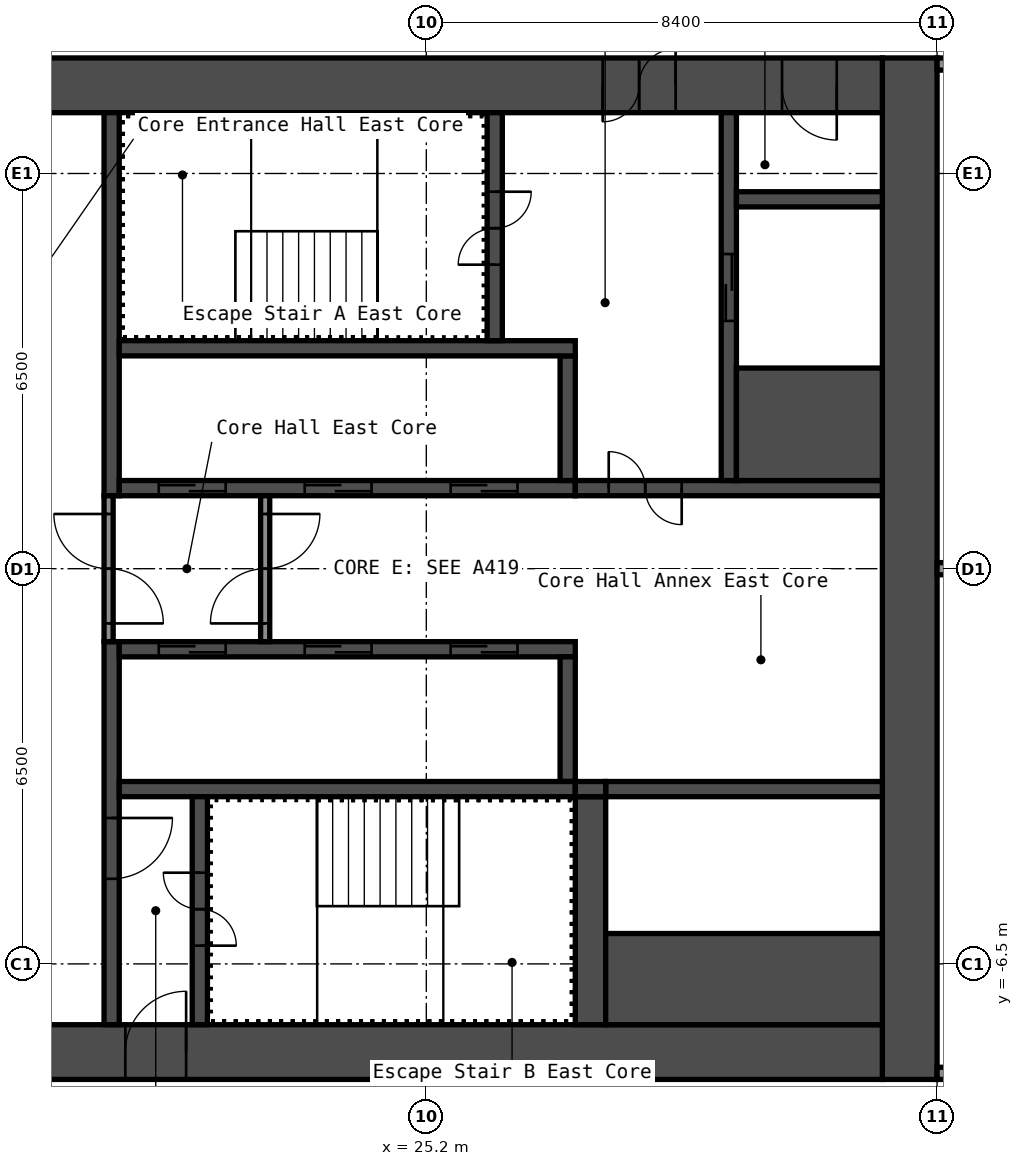
"""IFC4 building model, lengths in metres.
Left out: names, types, materials, properties, quantities, classifications, styles, units other than length and angle.
Written with IfcOpenShell. Run it as: python <this file> out.ifc"""

import sys

from ifc_helpers import new_model, si_unit, direction, frame, frame_2d, origin, place, context, subcontext, project, spatial, rectangle, extrude, element, fill, save


model = new_model("IFC4")
c1 = context("Model", 3, precision=1e-05, world=origin(), true_north=direction((0.0, 1.0)))
c2 = subcontext(c1, "Body", "Model", "MODEL_VIEW")
j1 = project(units=[si_unit("LENGTHUNIT", "METRE"), si_unit("PLANEANGLEUNIT", "RADIAN")], contexts=[c1])
p1 = place(None, origin())
s1 = spatial("IfcSite", under=j1, at=p1, CompositionType="ELEMENT")
p2 = place(p1, origin())
s2 = spatial("IfcBuilding", under=s1, at=p2, CompositionType="ELEMENT")
p3 = place(p2, frame((0.0, 0.0, 124.6)))
s3 = spatial("IfcBuildingStorey", under=s2, at=p3, CompositionType="ELEMENT", Elevation=124.6)
p4 = place(p3, frame((33.15, -8.4, 0.0), z_axis=(0.0, 0.0, 1.0), x_axis=(0.0, 1.0, 0.0)))
e1 = element("IfcWall", 1, at=p4, inside=s3, PredefinedType="SHEAR", context=c2, shape_type="SweptSolid", body=[
    extrude(rectangle(XDim=16.8, YDim=0.9, at=frame_2d((8.4, 0.0))), origin(), (0.0, 0.0, 1.0), 5.95),
])
p5 = place(p3, frame((17.7, 7.95, 0.0), z_axis=(0.0, 0.0, 1.0), x_axis=(1.0, 0.0, 0.0)))
e2 = element("IfcWall", 2, at=p5, inside=s3, PredefinedType="SHEAR", context=c2, shape_type="SweptSolid", body=[
    extrude(rectangle(XDim=15.0, YDim=0.9, at=frame_2d((7.5, 0.0))), origin(), (0.0, 0.0, 1.0), 5.95),
])
p6 = place(p5, frame((10.4, 0.0, 0.0)))
e3 = element("IfcOpeningElement", 3, at=p6, cuts=e2, PredefinedType="OPENING", context=c2, shape_type="SweptSolid", body=[
    extrude(rectangle(XDim=1.2, YDim=2.1, at=frame_2d((0.6, 1.05))), frame((0.0, 0.46, 0.0), z_axis=(0.0, -1.0, 0.0), x_axis=(1.0, 0.0, 0.0)), (0.0, 0.0, 1.0), 0.92),
])
p7 = place(p5, frame((13.35, 0.0, 0.0)))
e4 = element("IfcOpeningElement", 4, at=p7, cuts=e2, PredefinedType="OPENING", context=c2, shape_type="SweptSolid", body=[
    extrude(rectangle(XDim=0.9, YDim=2.1, at=frame_2d((0.45, 1.05))), frame((0.0, 0.46, 0.0), z_axis=(0.0, -1.0, 0.0), x_axis=(1.0, 0.0, 0.0)), (0.0, 0.0, 1.0), 0.92),
])
p8 = place(p3, frame((17.7, -7.95, 0.0), z_axis=(0.0, 0.0, 1.0), x_axis=(1.0, 0.0, 0.0)))
e5 = element("IfcWall", 5, at=p8, inside=s3, PredefinedType="SHEAR", context=c2, shape_type="SweptSolid", body=[
    extrude(rectangle(XDim=15.0, YDim=0.9, at=frame_2d((7.5, 0.0))), origin(), (0.0, 0.0, 1.0), 5.95),
])
p9 = place(p8, frame((2.55, 0.0, 0.0)))
e6 = element("IfcOpeningElement", 6, at=p9, cuts=e5, PredefinedType="OPENING", context=c2, shape_type="SweptSolid", body=[
    extrude(rectangle(XDim=1.0, YDim=2.1, at=frame_2d((0.5, 1.05))), frame((0.0, 0.46, 0.0), z_axis=(0.0, -1.0, 0.0), x_axis=(1.0, 0.0, 0.0)), (0.0, 0.0, 1.0), 0.92),
])
p10 = place(p3, frame((20.025, 1.2, 0.0), z_axis=(0.0, 0.0, 1.0), x_axis=(0.0, 1.0, 0.0)))
e7 = element("IfcWall", 7, at=p10, inside=s3, PredefinedType="SHEAR", context=c2, shape_type="SweptSolid", body=[
    extrude(rectangle(XDim=6.3, YDim=0.25, at=frame_2d((3.15, 0.0))), origin(), (0.0, 0.0, 1.0), 5.95),
])
p11 = place(p3, frame((20.025, -7.5, 0.0), z_axis=(0.0, 0.0, 1.0), x_axis=(0.0, 1.0, 0.0)))
e8 = element("IfcWall", 8, at=p11, inside=s3, PredefinedType="SHEAR", context=c2, shape_type="SweptSolid", body=[
    extrude(rectangle(XDim=6.3, YDim=0.25, at=frame_2d((3.15, 0.0))), origin(), (0.0, 0.0, 1.0), 5.95),
])
p12 = place(p11, frame((2.4, 0.0, 0.0)))
e9 = element("IfcOpeningElement", 9, at=p12, cuts=e8, PredefinedType="OPENING", context=c2, shape_type="SweptSolid", body=[
    extrude(rectangle(XDim=1.0, YDim=2.1, at=frame_2d((0.5, 1.05))), frame((0.0, 0.135, 0.0), z_axis=(0.0, -1.0, 0.0), x_axis=(1.0, 0.0, 0.0)), (0.0, 0.0, 1.0), 0.27),
])
p13 = place(p3, frame((20.15, 1.325, 0.0), z_axis=(0.0, 0.0, 1.0), x_axis=(1.0, 0.0, 0.0)))
e10 = element("IfcWall", 10, at=p13, inside=s3, PredefinedType="SHEAR", context=c2, shape_type="SweptSolid", body=[
    extrude(rectangle(XDim=7.5, YDim=0.25, at=frame_2d((3.75, 0.0))), origin(), (0.0, 0.0, 1.0), 5.95),
])
p14 = place(p13, frame((0.65, 0.0, 0.0)))
e11 = element("IfcOpeningElement", 11, at=p14, cuts=e10, PredefinedType="OPENING", context=c2, shape_type="SweptSolid", body=[
    extrude(rectangle(XDim=1.1, YDim=2.1, at=frame_2d((0.55, 1.05))), frame((0.0, 0.135, 0.0), z_axis=(0.0, -1.0, 0.0), x_axis=(1.0, 0.0, 0.0)), (0.0, 0.0, 1.0), 0.27),
])
p15 = place(p13, frame((3.05, 0.0, 0.0)))
e12 = element("IfcOpeningElement", 12, at=p15, cuts=e10, PredefinedType="OPENING", context=c2, shape_type="SweptSolid", body=[
    extrude(rectangle(XDim=1.1, YDim=2.1, at=frame_2d((0.55, 1.05))), frame((0.0, 0.135, 0.0), z_axis=(0.0, -1.0, 0.0), x_axis=(1.0, 0.0, 0.0)), (0.0, 0.0, 1.0), 0.27),
])
p16 = place(p13, frame((5.45, 0.0, 0.0)))
e13 = element("IfcOpeningElement", 13, at=p16, cuts=e10, PredefinedType="OPENING", context=c2, shape_type="SweptSolid", body=[
    extrude(rectangle(XDim=1.1, YDim=2.1, at=frame_2d((0.55, 1.05))), frame((0.0, 0.135, 0.0), z_axis=(0.0, -1.0, 0.0), x_axis=(1.0, 0.0, 0.0)), (0.0, 0.0, 1.0), 0.27),
])
p17 = place(p3, frame((27.525, 1.45, 0.0), z_axis=(0.0, 0.0, 1.0), x_axis=(0.0, 1.0, 0.0)))
e14 = element("IfcWall", 14, at=p17, inside=s3, PredefinedType="SHEAR", context=c2, shape_type="SweptSolid", body=[
    extrude(rectangle(XDim=2.05, YDim=0.25, at=frame_2d((1.025, 0.0))), origin(), (0.0, 0.0, 1.0), 5.95),
])
p18 = place(p3, frame((20.15, 3.625, 0.0), z_axis=(0.0, 0.0, 1.0), x_axis=(1.0, 0.0, 0.0)))
e15 = element("IfcWall", 15, at=p18, inside=s3, PredefinedType="SHEAR", context=c2, shape_type="SweptSolid", body=[
    extrude(rectangle(XDim=7.5, YDim=0.25, at=frame_2d((3.75, 0.0))), origin(), (0.0, 0.0, 1.0), 5.95),
])
p19 = place(p3, frame((26.325, 3.75, 0.0), z_axis=(0.0, 0.0, 1.0), x_axis=(0.0, 1.0, 0.0)))
e16 = element("IfcWall", 16, at=p19, inside=s3, PredefinedType="SHEAR", context=c2, shape_type="SweptSolid", body=[
    extrude(rectangle(XDim=3.75, YDim=0.25, at=frame_2d((1.875, 0.0))), origin(), (0.0, 0.0, 1.0), 5.95),
])
p20 = place(p19, frame((1.25, 0.0, 0.0)))
e17 = element("IfcOpeningElement", 17, at=p20, cuts=e16, PredefinedType="OPENING", context=c2, shape_type="SweptSolid", body=[
    extrude(rectangle(XDim=1.2, YDim=2.1, at=frame_2d((0.6, 1.05))), frame((0.0, 0.135, 0.0), z_axis=(0.0, -1.0, 0.0), x_axis=(1.0, 0.0, 0.0)), (0.0, 0.0, 1.0), 0.27),
])
p21 = place(p3, frame((27.65, 1.325, 0.0), z_axis=(0.0, 0.0, 1.0), x_axis=(1.0, 0.0, 0.0)))
e18 = element("IfcWall", 18, at=p21, inside=s3, PredefinedType="SHEAR", context=c2, shape_type="SweptSolid", body=[
    extrude(rectangle(XDim=5.05, YDim=0.25, at=frame_2d((2.525, 0.0))), origin(), (0.0, 0.0, 1.0), 5.95),
])
p22 = place(p21, frame((0.55, 0.0, 0.0)))
e19 = element("IfcOpeningElement", 19, at=p22, cuts=e18, PredefinedType="OPENING", context=c2, shape_type="SweptSolid", body=[
    extrude(rectangle(XDim=1.2, YDim=2.1, at=frame_2d((0.6, 1.05))), frame((0.0, 0.135, 0.0), z_axis=(0.0, -1.0, 0.0), x_axis=(1.0, 0.0, 0.0)), (0.0, 0.0, 1.0), 0.27),
])
p23 = place(p3, frame((30.175, 1.45, 0.0), z_axis=(0.0, 0.0, 1.0), x_axis=(0.0, 1.0, 0.0)))
e20 = element("IfcWall", 20, at=p23, inside=s3, PredefinedType="SHEAR", context=c2, shape_type="SweptSolid", body=[
    extrude(rectangle(XDim=6.05, YDim=0.25, at=frame_2d((3.025, 0.0))), origin(), (0.0, 0.0, 1.0), 5.95),
])
p24 = place(p23, frame((2.625, 0.0, 0.0)))
e21 = element("IfcOpeningElement", 21, at=p24, cuts=e20, PredefinedType="OPENING", context=c2, shape_type="SweptSolid", body=[
    extrude(rectangle(XDim=1.1, YDim=2.1, at=frame_2d((0.55, 1.05))), frame((0.0, 0.135, 0.0), z_axis=(0.0, -1.0, 0.0), x_axis=(1.0, 0.0, 0.0)), (0.0, 0.0, 1.0), 0.27),
])
p25 = place(p3, frame((30.3, 2.375, 0.0), z_axis=(0.0, 0.0, 1.0), x_axis=(1.0, 0.0, 0.0)))
e22 = element("IfcWall", 22, at=p25, inside=s3, PredefinedType="SHEAR", context=c2, shape_type="SweptSolid", body=[
    extrude(rectangle(XDim=2.4, YDim=1.85, at=frame_2d((1.2, 0.0))), origin(), (0.0, 0.0, 1.0), 5.95),
])
p26 = place(p3, frame((30.3, 6.075, 0.0), z_axis=(0.0, 0.0, 1.0), x_axis=(1.0, 0.0, 0.0)))
e23 = element("IfcWall", 23, at=p26, inside=s3, PredefinedType="SHEAR", context=c2, shape_type="SweptSolid", body=[
    extrude(rectangle(XDim=2.4, YDim=0.25, at=frame_2d((1.2, 0.0))), origin(), (0.0, 0.0, 1.0), 5.95),
])
p27 = place(p3, frame((20.15, -1.325, 0.0), z_axis=(0.0, 0.0, 1.0), x_axis=(1.0, 0.0, 0.0)))
e24 = element("IfcWall", 24, at=p27, inside=s3, PredefinedType="SHEAR", context=c2, shape_type="SweptSolid", body=[
    extrude(rectangle(XDim=7.5, YDim=0.25, at=frame_2d((3.75, 0.0))), origin(), (0.0, 0.0, 1.0), 5.95),
])
p28 = place(p27, frame((0.65, 0.0, 0.0)))
e25 = element("IfcOpeningElement", 25, at=p28, cuts=e24, PredefinedType="OPENING", context=c2, shape_type="SweptSolid", body=[
    extrude(rectangle(XDim=1.1, YDim=2.1, at=frame_2d((0.55, 1.05))), frame((0.0, 0.135, 0.0), z_axis=(0.0, -1.0, 0.0), x_axis=(1.0, 0.0, 0.0)), (0.0, 0.0, 1.0), 0.27),
])
p29 = place(p27, frame((3.05, 0.0, 0.0)))
e26 = element("IfcOpeningElement", 26, at=p29, cuts=e24, PredefinedType="OPENING", context=c2, shape_type="SweptSolid", body=[
    extrude(rectangle(XDim=1.1, YDim=2.1, at=frame_2d((0.55, 1.05))), frame((0.0, 0.135, 0.0), z_axis=(0.0, -1.0, 0.0), x_axis=(1.0, 0.0, 0.0)), (0.0, 0.0, 1.0), 0.27),
])
p30 = place(p27, frame((5.45, 0.0, 0.0)))
e27 = element("IfcOpeningElement", 27, at=p30, cuts=e24, PredefinedType="OPENING", context=c2, shape_type="SweptSolid", body=[
    extrude(rectangle(XDim=1.1, YDim=2.1, at=frame_2d((0.55, 1.05))), frame((0.0, 0.135, 0.0), z_axis=(0.0, -1.0, 0.0), x_axis=(1.0, 0.0, 0.0)), (0.0, 0.0, 1.0), 0.27),
])
p31 = place(p3, frame((27.525, -3.5, 0.0), z_axis=(0.0, 0.0, 1.0), x_axis=(0.0, 1.0, 0.0)))
e28 = element("IfcWall", 28, at=p31, inside=s3, PredefinedType="SHEAR", context=c2, shape_type="SweptSolid", body=[
    extrude(rectangle(XDim=2.05, YDim=0.25, at=frame_2d((1.025, 0.0))), origin(), (0.0, 0.0, 1.0), 5.95),
])
p32 = place(p3, frame((20.15, -3.625, 0.0), z_axis=(0.0, 0.0, 1.0), x_axis=(1.0, 0.0, 0.0)))
e29 = element("IfcWall", 29, at=p32, inside=s3, PredefinedType="SHEAR", context=c2, shape_type="SweptSolid", body=[
    extrude(rectangle(XDim=7.5, YDim=0.25, at=frame_2d((3.75, 0.0))), origin(), (0.0, 0.0, 1.0), 5.95),
])
p33 = place(p3, frame((21.475, -7.5, 0.0), z_axis=(0.0, 0.0, 1.0), x_axis=(0.0, 1.0, 0.0)))
e30 = element("IfcWall", 30, at=p33, inside=s3, PredefinedType="SHEAR", context=c2, shape_type="SweptSolid", body=[
    extrude(rectangle(XDim=3.75, YDim=0.25, at=frame_2d((1.875, 0.0))), origin(), (0.0, 0.0, 1.0), 5.95),
])
p34 = place(p33, frame((1.3, 0.0, 0.0)))
e31 = element("IfcOpeningElement", 31, at=p34, cuts=e30, PredefinedType="OPENING", context=c2, shape_type="SweptSolid", body=[
    extrude(rectangle(XDim=1.2, YDim=2.1, at=frame_2d((0.6, 1.05))), frame((0.0, 0.135, 0.0), z_axis=(0.0, -1.0, 0.0), x_axis=(1.0, 0.0, 0.0)), (0.0, 0.0, 1.0), 0.27),
])
p35 = place(p3, frame((27.9, -7.5, 0.0), z_axis=(0.0, 0.0, 1.0), x_axis=(0.0, 1.0, 0.0)))
e32 = element("IfcWall", 32, at=p35, inside=s3, PredefinedType="SHEAR", context=c2, shape_type="SweptSolid", body=[
    extrude(rectangle(XDim=3.75, YDim=0.5, at=frame_2d((1.875, 0.0))), origin(), (0.0, 0.0, 1.0), 5.95),
])
p36 = place(p3, frame((28.15, -3.625, 0.0), z_axis=(0.0, 0.0, 1.0), x_axis=(1.0, 0.0, 0.0)))
e33 = element("IfcWall", 33, at=p36, inside=s3, PredefinedType="SHEAR", context=c2, shape_type="SweptSolid", body=[
    extrude(rectangle(XDim=4.55, YDim=0.25, at=frame_2d((2.275, 0.0))), origin(), (0.0, 0.0, 1.0), 5.95),
])
p37 = place(p3, frame((28.15, -6.75, 0.0), z_axis=(0.0, 0.0, 1.0), x_axis=(1.0, 0.0, 0.0)))
e34 = element("IfcWall", 34, at=p37, inside=s3, PredefinedType="SHEAR", context=c2, shape_type="SweptSolid", body=[
    extrude(rectangle(XDim=4.55, YDim=1.5, at=frame_2d((2.275, 0.0))), origin(), (0.0, 0.0, 1.0), 5.95),
])
p38 = place(p3, frame((27.65, -3.625, 0.0), z_axis=(0.0, 0.0, 1.0), x_axis=(1.0, 0.0, 0.0)))
e35 = element("IfcWall", 35, at=p38, inside=s3, PredefinedType="SHEAR", context=c2, shape_type="SweptSolid", body=[
    extrude(rectangle(XDim=0.5, YDim=0.25, at=frame_2d((0.25, 0.0))), origin(), (0.0, 0.0, 1.0), 5.95),
])
p39 = place(p3, frame((19.975, -1.2, 0.0), z_axis=(0.0, 0.0, 1.0), x_axis=(0.0, 1.0, 0.0)))
e36 = element("IfcWall", 36, at=p39, inside=s3, PredefinedType="PARTITIONING", context=c2, shape_type="SweptSolid", body=[
    extrude(rectangle(XDim=2.4, YDim=0.15, at=frame_2d((1.2, 0.0))), origin(), (0.0, 0.0, 1.0), 5.95),
])
p40 = place(p39, frame((0.3, 0.0, 0.0)))
e37 = element("IfcOpeningElement", 37, at=p40, cuts=e36, PredefinedType="OPENING", context=c2, shape_type="SweptSolid", body=[
    extrude(rectangle(XDim=1.8, YDim=2.1, at=frame_2d((0.9, 1.05))), frame((0.0, 0.085, 0.0), z_axis=(0.0, -1.0, 0.0), x_axis=(1.0, 0.0, 0.0)), (0.0, 0.0, 1.0), 0.17),
])
p41 = place(p3, frame((22.55, -1.2, 0.0), z_axis=(0.0, 0.0, 1.0), x_axis=(0.0, 1.0, 0.0)))
e38 = element("IfcWall", 38, at=p41, inside=s3, PredefinedType="PARTITIONING", context=c2, shape_type="SweptSolid", body=[
    extrude(rectangle(XDim=2.4, YDim=0.15, at=frame_2d((1.2, 0.0))), origin(), (0.0, 0.0, 1.0), 5.95),
])
p42 = place(p41, frame((0.3, 0.0, 0.0)))
e39 = element("IfcOpeningElement", 39, at=p42, cuts=e38, PredefinedType="OPENING", context=c2, shape_type="SweptSolid", body=[
    extrude(rectangle(XDim=1.8, YDim=2.1, at=frame_2d((0.9, 1.05))), frame((0.0, 0.085, 0.0), z_axis=(0.0, -1.0, 0.0), x_axis=(1.0, 0.0, 0.0)), (0.0, 0.0, 1.0), 0.17),
])
p43 = place(p3, frame((33.6, -8.3, 0.0), z_axis=(0.0, 0.0, 1.0), x_axis=(1.0, 0.0, 0.0)))
e40 = element("IfcWall", 40, at=p43, inside=s3, PredefinedType="PARTITIONING", context=c2, shape_type="SweptSolid", body=[
    extrude(rectangle(XDim=6.6, YDim=0.2, at=frame_2d((3.3, 0.0))), origin(), (0.0, 0.0, 1.0), 5.95),
])
p44 = place(p43, frame((2.8, 0.0, 0.0)))
e41 = element("IfcOpeningElement", 41, at=p44, cuts=e40, PredefinedType="OPENING", context=c2, shape_type="SweptSolid", body=[
    extrude(rectangle(XDim=1.0, YDim=2.1, at=frame_2d((0.5, 1.05))), frame((0.0, 0.11, 0.0), z_axis=(0.0, -1.0, 0.0), x_axis=(1.0, 0.0, 0.0)), (0.0, 0.0, 1.0), 0.22),
])
p45 = place(p3, frame((33.6, 0.0, 0.0), z_axis=(0.0, 0.0, 1.0), x_axis=(1.0, 0.0, 0.0)))
e42 = element("IfcWall", 42, at=p45, inside=s3, PredefinedType="PARTITIONING", context=c2, shape_type="SweptSolid", body=[
    extrude(rectangle(XDim=6.5, YDim=0.2, at=frame_2d((3.25, 0.0))), origin(), (0.0, 0.0, 1.0), 5.95),
])
p46 = place(p3, frame((33.6, 8.3, 0.0), z_axis=(0.0, 0.0, 1.0), x_axis=(1.0, 0.0, 0.0)))
e43 = element("IfcWall", 43, at=p46, inside=s3, PredefinedType="PARTITIONING", context=c2, shape_type="SweptSolid", body=[
    extrude(rectangle(XDim=6.6, YDim=0.2, at=frame_2d((3.3, 0.0))), origin(), (0.0, 0.0, 1.0), 5.95),
])
p47 = place(p46, frame((2.8, 0.0, 0.0)))
e44 = element("IfcOpeningElement", 44, at=p47, cuts=e43, PredefinedType="OPENING", context=c2, shape_type="SweptSolid", body=[
    extrude(rectangle(XDim=1.0, YDim=2.1, at=frame_2d((0.5, 1.05))), frame((0.0, 0.11, 0.0), z_axis=(0.0, -1.0, 0.0), x_axis=(1.0, 0.0, 0.0)), (0.0, 0.0, 1.0), 0.22),
])
p48 = place(p6, origin())
e45 = element("IfcDoor", 45, at=p48, inside=s3, OperationType="DOUBLE_DOOR_SINGLE_SWING", PredefinedType="DOOR", context=c2, shape_type="SweptSolid", body=[
    extrude(rectangle(XDim=1.2, YDim=2.1, at=frame_2d((0.6, 1.05))), frame((0.0, 0.025, 0.0), z_axis=(0.0, -1.0, 0.0), x_axis=(1.0, 0.0, 0.0)), (0.0, 0.0, 1.0), 0.05),
])
fill(e3, e45)
p49 = place(p7, origin())
e46 = element("IfcDoor", 46, at=p49, inside=s3, OperationType="SINGLE_SWING_RIGHT", PredefinedType="DOOR", context=c2, shape_type="SweptSolid", body=[
    extrude(rectangle(XDim=0.9, YDim=2.1, at=frame_2d((0.45, 1.05))), frame((0.0, 0.025, 0.0), z_axis=(0.0, -1.0, 0.0), x_axis=(1.0, 0.0, 0.0)), (0.0, 0.0, 1.0), 0.05),
])
fill(e4, e46)
p50 = place(p9, origin())
e47 = element("IfcDoor", 47, at=p50, inside=s3, OperationType="SINGLE_SWING_LEFT", PredefinedType="DOOR", context=c2, shape_type="SweptSolid", body=[
    extrude(rectangle(XDim=1.0, YDim=2.1, at=frame_2d((0.5, 1.05))), frame((0.0, 0.025, 0.0), z_axis=(0.0, -1.0, 0.0), x_axis=(1.0, 0.0, 0.0)), (0.0, 0.0, 1.0), 0.05),
])
fill(e6, e47)
p51 = place(p20, origin())
e48 = element("IfcDoor", 48, at=p51, inside=s3, OperationType="DOUBLE_DOOR_SINGLE_SWING", PredefinedType="DOOR", context=c2, shape_type="SweptSolid", body=[
    extrude(rectangle(XDim=1.2, YDim=2.1, at=frame_2d((0.6, 1.05))), frame((0.0, 0.025, 0.0), z_axis=(0.0, -1.0, 0.0), x_axis=(1.0, 0.0, 0.0)), (0.0, 0.0, 1.0), 0.05),
])
fill(e17, e48)
p52 = place(p34, origin())
e49 = element("IfcDoor", 49, at=p52, inside=s3, OperationType="DOUBLE_DOOR_SINGLE_SWING", PredefinedType="DOOR", context=c2, shape_type="SweptSolid", body=[
    extrude(rectangle(XDim=1.2, YDim=2.1, at=frame_2d((0.6, 1.05))), frame((0.0, 0.025, 0.0), z_axis=(0.0, -1.0, 0.0), x_axis=(1.0, 0.0, 0.0)), (0.0, 0.0, 1.0), 0.05),
])
fill(e31, e49)
p53 = place(p12, origin())
e50 = element("IfcDoor", 50, at=p53, inside=s3, OperationType="SINGLE_SWING_RIGHT", PredefinedType="DOOR", context=c2, shape_type="SweptSolid", body=[
    extrude(rectangle(XDim=1.0, YDim=2.1, at=frame_2d((0.5, 1.05))), frame((0.0, 0.025, 0.0), z_axis=(0.0, -1.0, 0.0), x_axis=(1.0, 0.0, 0.0)), (0.0, 0.0, 1.0), 0.05),
])
fill(e9, e50)
p54 = place(p22, origin())
e51 = element("IfcDoor", 51, at=p54, inside=s3, OperationType="DOUBLE_DOOR_SINGLE_SWING", PredefinedType="DOOR", context=c2, shape_type="SweptSolid", body=[
    extrude(rectangle(XDim=1.2, YDim=2.1, at=frame_2d((0.6, 1.05))), frame((0.0, 0.025, 0.0), z_axis=(0.0, -1.0, 0.0), x_axis=(1.0, 0.0, 0.0)), (0.0, 0.0, 1.0), 0.05),
])
fill(e19, e51)
p55 = place(p40, origin())
e52 = element("IfcDoor", 52, at=p55, inside=s3, OperationType="DOUBLE_DOOR_SINGLE_SWING", PredefinedType="DOOR", context=c2, shape_type="SweptSolid", body=[
    extrude(rectangle(XDim=1.8, YDim=2.1, at=frame_2d((0.9, 1.05))), frame((0.0, 0.025, 0.0), z_axis=(0.0, -1.0, 0.0), x_axis=(1.0, 0.0, 0.0)), (0.0, 0.0, 1.0), 0.05),
])
fill(e37, e52)
p56 = place(p42, origin())
e53 = element("IfcDoor", 53, at=p56, inside=s3, OperationType="DOUBLE_DOOR_SINGLE_SWING", PredefinedType="DOOR", context=c2, shape_type="SweptSolid", body=[
    extrude(rectangle(XDim=1.8, YDim=2.1, at=frame_2d((0.9, 1.05))), frame((0.0, 0.025, 0.0), z_axis=(0.0, -1.0, 0.0), x_axis=(1.0, 0.0, 0.0)), (0.0, 0.0, 1.0), 0.05),
])
fill(e39, e53)
p57 = place(p14, origin())
e54 = element("IfcDoor", 54, at=p57, inside=s3, OperationType="DOUBLE_DOOR_SLIDING", PredefinedType="DOOR", context=c2, shape_type="SweptSolid", body=[
    extrude(rectangle(XDim=1.1, YDim=2.1, at=frame_2d((0.55, 1.05))), frame((0.0, 0.025, 0.0), z_axis=(0.0, -1.0, 0.0), x_axis=(1.0, 0.0, 0.0)), (0.0, 0.0, 1.0), 0.05),
])
fill(e11, e54)
p58 = place(p15, origin())
e55 = element("IfcDoor", 55, at=p58, inside=s3, OperationType="DOUBLE_DOOR_SLIDING", PredefinedType="DOOR", context=c2, shape_type="SweptSolid", body=[
    extrude(rectangle(XDim=1.1, YDim=2.1, at=frame_2d((0.55, 1.05))), frame((0.0, 0.025, 0.0), z_axis=(0.0, -1.0, 0.0), x_axis=(1.0, 0.0, 0.0)), (0.0, 0.0, 1.0), 0.05),
])
fill(e12, e55)
p59 = place(p16, origin())
e56 = element("IfcDoor", 56, at=p59, inside=s3, OperationType="DOUBLE_DOOR_SLIDING", PredefinedType="DOOR", context=c2, shape_type="SweptSolid", body=[
    extrude(rectangle(XDim=1.1, YDim=2.1, at=frame_2d((0.55, 1.05))), frame((0.0, 0.025, 0.0), z_axis=(0.0, -1.0, 0.0), x_axis=(1.0, 0.0, 0.0)), (0.0, 0.0, 1.0), 0.05),
])
fill(e13, e56)
p60 = place(p28, origin())
e57 = element("IfcDoor", 57, at=p60, inside=s3, OperationType="DOUBLE_DOOR_SLIDING", PredefinedType="DOOR", context=c2, shape_type="SweptSolid", body=[
    extrude(rectangle(XDim=1.1, YDim=2.1, at=frame_2d((0.55, 1.05))), frame((0.0, 0.025, 0.0), z_axis=(0.0, -1.0, 0.0), x_axis=(1.0, 0.0, 0.0)), (0.0, 0.0, 1.0), 0.05),
])
fill(e25, e57)
p61 = place(p29, origin())
e58 = element("IfcDoor", 58, at=p61, inside=s3, OperationType="DOUBLE_DOOR_SLIDING", PredefinedType="DOOR", context=c2, shape_type="SweptSolid", body=[
    extrude(rectangle(XDim=1.1, YDim=2.1, at=frame_2d((0.55, 1.05))), frame((0.0, 0.025, 0.0), z_axis=(0.0, -1.0, 0.0), x_axis=(1.0, 0.0, 0.0)), (0.0, 0.0, 1.0), 0.05),
])
fill(e26, e58)
p62 = place(p30, origin())
e59 = element("IfcDoor", 59, at=p62, inside=s3, OperationType="DOUBLE_DOOR_SLIDING", PredefinedType="DOOR", context=c2, shape_type="SweptSolid", body=[
    extrude(rectangle(XDim=1.1, YDim=2.1, at=frame_2d((0.55, 1.05))), frame((0.0, 0.025, 0.0), z_axis=(0.0, -1.0, 0.0), x_axis=(1.0, 0.0, 0.0)), (0.0, 0.0, 1.0), 0.05),
])
fill(e27, e59)
p63 = place(p24, origin())
e60 = element("IfcDoor", 60, at=p63, inside=s3, OperationType="DOUBLE_DOOR_SLIDING", PredefinedType="DOOR", context=c2, shape_type="SweptSolid", body=[
    extrude(rectangle(XDim=1.1, YDim=2.1, at=frame_2d((0.55, 1.05))), frame((0.0, 0.025, 0.0), z_axis=(0.0, -1.0, 0.0), x_axis=(1.0, 0.0, 0.0)), (0.0, 0.0, 1.0), 0.05),
])
fill(e21, e60)
save(model, sys.argv[1])
